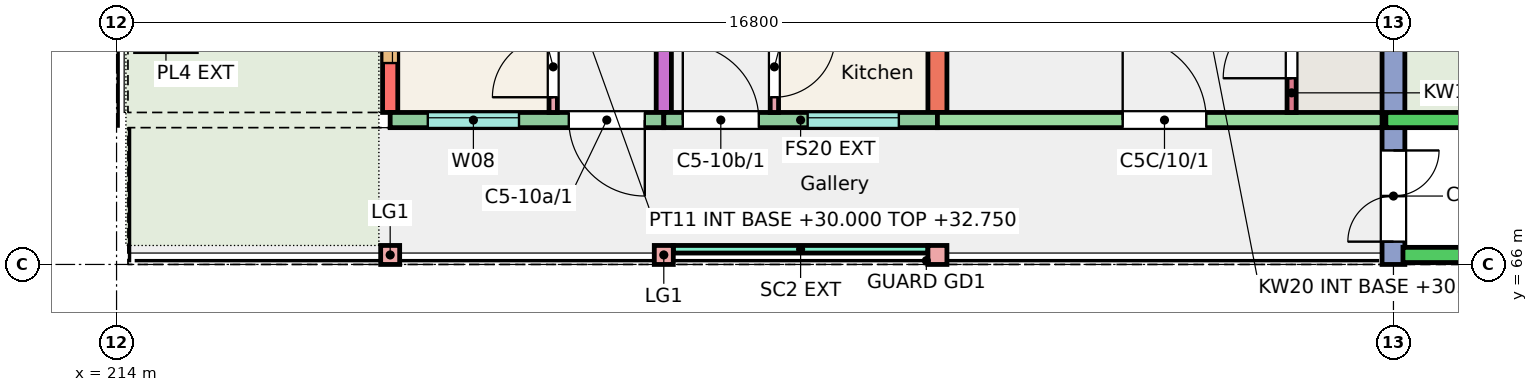
"""IFC4 building model, lengths in metres.
Left out: names, types, materials, properties, quantities, classifications, styles, units other than length and angle.
Written with IfcOpenShell. Run it as: python <this file> out.ifc"""

import sys

from ifc_helpers import new_model, si_unit, direction, frame, frame_2d, origin, origin_2d, place, context, subcontext, project, spatial, rectangle, extrude, element, fill, save


model = new_model("IFC4")
c1 = context("Model", 3, precision=1e-05, world=origin(), true_north=direction((0.0, 1.0)))
c2 = subcontext(c1, "Body", "Model", "MODEL_VIEW")
j1 = project(units=[si_unit("LENGTHUNIT", "METRE"), si_unit("PLANEANGLEUNIT", "RADIAN")], contexts=[c1])
p1 = place(None, origin())
s1 = spatial("IfcSite", under=j1, at=p1, CompositionType="ELEMENT")
p2 = place(p1, origin())
s2 = spatial("IfcBuilding", under=s1, at=p2, CompositionType="ELEMENT")
p3 = place(p2, frame((0.0, 0.0, 30.0)))
s3 = spatial("IfcBuildingStorey", under=s2, at=p3, CompositionType="ELEMENT", Elevation=30.0)
p4 = place(p3, frame((217.6, 68.0, 0.0), z_axis=(0.0, 0.0, 1.0), x_axis=(0.0, 1.0, 0.0)))
e1 = element("IfcWall", 1, at=p4, inside=s3, PredefinedType="SHEAR", context=c2, shape_type="SweptSolid", body=[
    extrude(rectangle(XDim=9.0, YDim=0.2, at=frame_2d((4.5, 0.0))), origin(), (0.0, 0.0, 1.0), 3.0),
])
p5 = place(p4, frame((0.65, 0.0, 0.9)))
e2 = element("IfcOpeningElement", 2, at=p5, cuts=e1, PredefinedType="OPENING", context=c2, shape_type="SweptSolid", body=[
    extrude(rectangle(XDim=1.2, YDim=1.5, at=frame_2d((0.6, 0.75))), frame((0.0, 0.11, 0.0), z_axis=(0.0, -1.0, 0.0), x_axis=(1.0, 0.0, 0.0)), (0.0, 0.0, 1.0), 0.22),
])
p6 = place(p4, frame((4.808, 0.0, 0.9)))
e3 = element("IfcOpeningElement", 3, at=p6, cuts=e1, PredefinedType="OPENING", context=c2, shape_type="SweptSolid", body=[
    extrude(rectangle(XDim=1.2, YDim=1.5, at=frame_2d((0.6, 0.75))), frame((0.0, 0.11, 0.0), z_axis=(0.0, -1.0, 0.0), x_axis=(1.0, 0.0, 0.0)), (0.0, 0.0, 1.0), 0.22),
])
p7 = place(p4, frame((6.305, 0.0, 0.0)))
e4 = element("IfcOpeningElement", 4, at=p7, cuts=e1, PredefinedType="OPENING", context=c2, shape_type="SweptSolid", body=[
    extrude(rectangle(XDim=1.0, YDim=2.1, at=frame_2d((0.5, 1.05))), frame((0.0, 0.11, 0.0), z_axis=(0.0, -1.0, 0.0), x_axis=(1.0, 0.0, 0.0)), (0.0, 0.0, 1.0), 0.22),
])
p8 = place(p3, frame((221.2, 68.0, 0.0), z_axis=(0.0, 0.0, 1.0), x_axis=(0.0, 1.0, 0.0)))
e5 = element("IfcWall", 5, at=p8, inside=s3, PredefinedType="SHEAR", context=c2, shape_type="SweptSolid", body=[
    extrude(rectangle(XDim=9.0, YDim=0.2, at=frame_2d((4.5, 0.0))), origin(), (0.0, 0.0, 1.0), 3.0),
])
p9 = place(p3, frame((224.8, 68.0, 0.0), z_axis=(0.0, 0.0, 1.0), x_axis=(0.0, 1.0, 0.0)))
e6 = element("IfcWall", 6, at=p9, inside=s3, PredefinedType="SHEAR", context=c2, shape_type="SweptSolid", body=[
    extrude(rectangle(XDim=9.0, YDim=0.25, at=frame_2d((4.5, 0.0))), origin(), (0.0, 0.0, 1.0), 3.0),
])
p10 = place(p3, frame((230.8, 66.0, 0.0), z_axis=(0.0, 0.0, 1.0), x_axis=(0.0, 1.0, 0.0)))
e7 = element("IfcWall", 7, at=p10, inside=s3, PredefinedType="SHEAR", context=c2, shape_type="SweptSolid", body=[
    extrude(rectangle(XDim=11.0, YDim=0.3, at=frame_2d((5.5, 0.0))), origin(), (0.0, 0.0, 1.0), 3.0),
])
p11 = place(p10, frame((0.3, 0.0, 0.0)))
e8 = element("IfcOpeningElement", 8, at=p11, cuts=e7, PredefinedType="OPENING", context=c2, shape_type="SweptSolid", body=[
    extrude(rectangle(XDim=1.2, YDim=2.1, at=frame_2d((0.6, 1.05))), frame((0.0, 0.16, 0.0), z_axis=(0.0, -1.0, 0.0), x_axis=(1.0, 0.0, 0.0)), (0.0, 0.0, 1.0), 0.32),
])
p12 = place(p3, frame((217.6, 67.9, 0.0), z_axis=(0.0, 0.0, 1.0), x_axis=(1.0, 0.0, 0.0)))
e9 = element("IfcWall", 9, at=p12, inside=s3, PredefinedType="SOLIDWALL", context=c2, shape_type="SweptSolid", body=[
    extrude(rectangle(XDim=3.6, YDim=0.2, at=frame_2d((1.8, 0.0))), origin(), (0.0, 0.0, 1.0), 3.0),
])
p13 = place(p12, frame((0.495, 0.0, 1.1)))
e10 = element("IfcOpeningElement", 10, at=p13, cuts=e9, PredefinedType="OPENING", context=c2, shape_type="SweptSolid", body=[
    extrude(rectangle(XDim=1.2, YDim=1.3, at=frame_2d((0.6, 0.65))), frame((0.0, 0.11, 0.0), z_axis=(0.0, -1.0, 0.0), x_axis=(1.0, 0.0, 0.0)), (0.0, 0.0, 1.0), 0.22),
])
p14 = place(p12, frame((2.35, 0.0, 0.0)))
e11 = element("IfcOpeningElement", 11, at=p14, cuts=e9, PredefinedType="OPENING", context=c2, shape_type="SweptSolid", body=[
    extrude(rectangle(XDim=1.0, YDim=2.1, at=frame_2d((0.5, 1.05))), frame((0.0, 0.11, 0.0), z_axis=(0.0, -1.0, 0.0), x_axis=(1.0, 0.0, 0.0)), (0.0, 0.0, 1.0), 0.22),
])
p15 = place(p3, frame((221.2, 67.9, 0.0), z_axis=(0.0, 0.0, 1.0), x_axis=(1.0, 0.0, 0.0)))
e12 = element("IfcWall", 12, at=p15, inside=s3, PredefinedType="SOLIDWALL", context=c2, shape_type="SweptSolid", body=[
    extrude(rectangle(XDim=3.6, YDim=0.2, at=frame_2d((1.8, 0.0))), origin(), (0.0, 0.0, 1.0), 3.0),
])
p16 = place(p15, frame((1.893, 0.0, 1.1)))
e13 = element("IfcOpeningElement", 13, at=p16, cuts=e12, PredefinedType="OPENING", context=c2, shape_type="SweptSolid", body=[
    extrude(rectangle(XDim=1.2, YDim=1.3, at=frame_2d((0.6, 0.65))), frame((0.0, 0.11, 0.0), z_axis=(0.0, -1.0, 0.0), x_axis=(1.0, 0.0, 0.0)), (0.0, 0.0, 1.0), 0.22),
])
p17 = place(p15, frame((0.25, 0.0, 0.0)))
e14 = element("IfcOpeningElement", 14, at=p17, cuts=e12, PredefinedType="OPENING", context=c2, shape_type="SweptSolid", body=[
    extrude(rectangle(XDim=1.0, YDim=2.1, at=frame_2d((0.5, 1.05))), frame((0.0, 0.11, 0.0), z_axis=(0.0, -1.0, 0.0), x_axis=(1.0, 0.0, 0.0)), (0.0, 0.0, 1.0), 0.22),
])
p18 = place(p3, frame((224.8, 67.9, 0.0), z_axis=(0.0, 0.0, 1.0), x_axis=(1.0, 0.0, 0.0)))
e15 = element("IfcWall", 15, at=p18, inside=s3, PredefinedType="SHEAR", context=c2, shape_type="SweptSolid", body=[
    extrude(rectangle(XDim=5.85, YDim=0.2, at=frame_2d((2.925, 0.0))), origin(), (0.0, 0.0, 1.0), 3.0),
])
p19 = place(p18, frame((2.438, 0.0, 0.0)))
e16 = element("IfcOpeningElement", 16, at=p19, cuts=e15, PredefinedType="OPENING", context=c2, shape_type="SweptSolid", body=[
    extrude(rectangle(XDim=1.1, YDim=2.1, at=frame_2d((0.55, 1.05))), frame((0.0, 0.11, 0.0), z_axis=(0.0, -1.0, 0.0), x_axis=(1.0, 0.0, 0.0)), (0.0, 0.0, 1.0), 0.22),
])
p20 = place(p3, frame((229.46, 68.0, 0.0), z_axis=(0.0, 0.0, 1.0), x_axis=(0.0, 1.0, 0.0)))
e17 = element("IfcWall", 17, at=p20, inside=s3, PredefinedType="SHEAR", context=c2, shape_type="SweptSolid", body=[
    extrude(rectangle(XDim=1.72, YDim=0.12, at=frame_2d((0.86, 0.0))), origin(), (0.0, 0.0, 1.0), 3.0),
])
p21 = place(p20, frame((0.45, 0.0, 0.0)))
e18 = element("IfcOpeningElement", 18, at=p21, cuts=e17, PredefinedType="OPENING", context=c2, shape_type="SweptSolid", body=[
    extrude(rectangle(XDim=0.9, YDim=2.1, at=frame_2d((0.45, 1.05))), frame((0.0, 0.07, 0.0), z_axis=(0.0, -1.0, 0.0), x_axis=(1.0, 0.0, 0.0)), (0.0, 0.0, 1.0), 0.14),
])
for number, where, z_axis, x_axis in (
    (19, (217.6, 66.125, 0.0), (0.0, 0.0, 1.0), (1.0, 0.0, 0.0)),
    (20, (221.2, 66.125, 0.0), (0.0, 0.0, 1.0), (1.0, 0.0, 0.0)),
    (21, (224.8, 66.125, 0.0), (0.0, 0.0, 1.0), (1.0, 0.0, 0.0)),
):
    element("IfcColumn", number, at=place(p3, frame(where, z_axis=z_axis, x_axis=x_axis)), inside=s3, PredefinedType="COLUMN", context=c2, shape_type="SweptSolid", body=[
        extrude(rectangle(XDim=0.25, YDim=0.25, at=origin_2d()), origin(), (0.0, 0.0, 1.0), 3.0),
    ])
p22 = place(p3, frame((230.7, 67.9, 0.0), z_axis=(0.0, 0.0, 1.0), x_axis=(1.0, 0.0, 0.0)))
e22 = element("IfcWall", 22, at=p22, inside=s3, PredefinedType="PARAPET", context=c2, shape_type="SweptSolid", body=[
    extrude(rectangle(XDim=6.2, YDim=0.2, at=frame_2d((3.1, 0.0))), origin(), (0.0, 0.0, 1.0), 1.1),
])
p23 = place(p3, frame((230.925, 66.125, 0.0), z_axis=(0.0, 0.0, 1.0), x_axis=(1.0, 0.0, 0.0)))
e23 = element("IfcWall", 23, at=p23, inside=s3, PredefinedType="PARAPET", context=c2, shape_type="SweptSolid", body=[
    extrude(rectangle(XDim=5.75, YDim=0.2, at=frame_2d((2.875, 0.0))), origin(), (0.0, 0.0, 1.0), 1.1),
])
p24 = place(p3, frame((214.25, 68.9, 0.01), z_axis=(0.0, 0.0, 1.0), x_axis=(1.0, 0.0, 0.0)))
e24 = element("IfcWall", 24, at=p24, inside=s3, PredefinedType="SOLIDWALL", context=c2, shape_type="SweptSolid", body=[
    extrude(rectangle(XDim=0.8, YDim=0.2, at=frame_2d((0.4, 0.0))), origin(), (0.0, 0.0, 1.0), 0.45),
])
p25 = place(p3, frame((221.325, 66.2, 0.0), z_axis=(0.0, 0.0, 1.0), x_axis=(1.0, 0.0, 0.0)))
e25 = element("IfcWall", 25, at=p25, inside=s3, PredefinedType="SOLIDWALL", context=c2, shape_type="SweptSolid", body=[
    extrude(rectangle(XDim=3.35, YDim=0.1, at=frame_2d((1.675, 0.0))), origin(), (0.0, 0.0, 1.0), 2.45),
])
p26 = place(p3, frame((219.745, 68.0, 0.0), z_axis=(0.0, 0.0, 1.0), x_axis=(0.0, 1.0, 0.0)))
e26 = element("IfcWall", 26, at=p26, inside=s3, PredefinedType="PARTITIONING", context=c2, shape_type="SweptSolid", body=[
    extrude(rectangle(XDim=4.5, YDim=0.11, at=frame_2d((2.25, 0.0))), origin(), (0.0, 0.0, 1.0), 2.75),
])
p27 = place(p26, frame((0.2, 0.0, 0.0)))
e27 = element("IfcOpeningElement", 27, at=p27, cuts=e26, PredefinedType="OPENING", context=c2, shape_type="SweptSolid", body=[
    extrude(rectangle(XDim=0.8, YDim=2.1, at=frame_2d((0.4, 1.05))), frame((0.0, 0.065, 0.0), z_axis=(0.0, -1.0, 0.0), x_axis=(1.0, 0.0, 0.0)), (0.0, 0.0, 1.0), 0.13),
])
p28 = place(p26, frame((3.55, 0.0, 0.0)))
e28 = element("IfcOpeningElement", 28, at=p28, cuts=e26, PredefinedType="OPENING", context=c2, shape_type="SweptSolid", body=[
    extrude(rectangle(XDim=0.8, YDim=2.1, at=frame_2d((0.4, 1.05))), frame((0.0, 0.065, 0.0), z_axis=(0.0, -1.0, 0.0), x_axis=(1.0, 0.0, 0.0)), (0.0, 0.0, 1.0), 0.13),
])
p29 = place(p3, frame((222.655, 68.0, 0.0), z_axis=(0.0, 0.0, 1.0), x_axis=(0.0, 1.0, 0.0)))
e29 = element("IfcWall", 29, at=p29, inside=s3, PredefinedType="PARTITIONING", context=c2, shape_type="SweptSolid", body=[
    extrude(rectangle(XDim=4.3, YDim=0.11, at=frame_2d((2.15, 0.0))), origin(), (0.0, 0.0, 1.0), 2.8),
])
p30 = place(p29, frame((0.2, 0.0, 0.0)))
e30 = element("IfcOpeningElement", 30, at=p30, cuts=e29, PredefinedType="OPENING", context=c2, shape_type="SweptSolid", body=[
    extrude(rectangle(XDim=0.8, YDim=2.1, at=frame_2d((0.4, 1.05))), frame((0.0, 0.065, 0.0), z_axis=(0.0, -1.0, 0.0), x_axis=(1.0, 0.0, 0.0)), (0.0, 0.0, 1.0), 0.13),
])
p31 = place(p29, frame((3.35, 0.0, 0.0)))
e31 = element("IfcOpeningElement", 31, at=p31, cuts=e29, PredefinedType="OPENING", context=c2, shape_type="SweptSolid", body=[
    extrude(rectangle(XDim=0.8, YDim=2.1, at=frame_2d((0.4, 1.05))), frame((0.0, 0.065, 0.0), z_axis=(0.0, -1.0, 0.0), x_axis=(1.0, 0.0, 0.0)), (0.0, 0.0, 1.0), 0.13),
])
p32 = place(p13, origin())
e32 = element("IfcWindow", 32, at=p32, inside=s3, PartitioningType="SINGLE_PANEL", PredefinedType="WINDOW", context=c2, shape_type="SweptSolid", body=[
    extrude(rectangle(XDim=1.2, YDim=1.3, at=frame_2d((0.6, 0.65))), frame((0.0, 0.06, 0.0), z_axis=(0.0, -1.0, 0.0), x_axis=(1.0, 0.0, 0.0)), (0.0, 0.0, 1.0), 0.06),
])
fill(e10, e32)
p33 = place(p5, origin())
e33 = element("IfcWindow", 33, at=p33, inside=s3, PartitioningType="SINGLE_PANEL", PredefinedType="WINDOW", context=c2, shape_type="SweptSolid", body=[
    extrude(rectangle(XDim=1.2, YDim=1.5, at=frame_2d((0.6, 0.75))), frame((0.0, 0.0, 0.0), z_axis=(0.0, -1.0, 0.0), x_axis=(1.0, 0.0, 0.0)), (0.0, 0.0, 1.0), 0.06),
])
fill(e2, e33)
p34 = place(p16, origin())
e34 = element("IfcWindow", 34, at=p34, inside=s3, PartitioningType="SINGLE_PANEL", PredefinedType="WINDOW", context=c2, shape_type="SweptSolid", body=[
    extrude(rectangle(XDim=1.2, YDim=1.3, at=frame_2d((0.6, 0.65))), frame((0.0, 0.06, 0.0), z_axis=(0.0, -1.0, 0.0), x_axis=(1.0, 0.0, 0.0)), (0.0, 0.0, 1.0), 0.06),
])
fill(e13, e34)
p35 = place(p14, origin())
e35 = element("IfcDoor", 35, at=p35, inside=s3, OperationType="SINGLE_SWING_RIGHT", PredefinedType="DOOR", context=c2, shape_type="SweptSolid", body=[
    extrude(rectangle(XDim=1.0, YDim=2.1, at=frame_2d((0.5, 1.05))), frame((0.0, 0.025, 0.0), z_axis=(0.0, -1.0, 0.0), x_axis=(1.0, 0.0, 0.0)), (0.0, 0.0, 1.0), 0.05),
])
fill(e11, e35)
p36 = place(p27, origin())
e36 = element("IfcDoor", 36, at=p36, inside=s3, OperationType="SINGLE_SWING_LEFT", PredefinedType="DOOR", context=c2, shape_type="SweptSolid", body=[
    extrude(rectangle(XDim=0.8, YDim=2.1, at=frame_2d((0.4, 1.05))), frame((0.0, 0.025, 0.0), z_axis=(0.0, -1.0, 0.0), x_axis=(1.0, 0.0, 0.0)), (0.0, 0.0, 1.0), 0.05),
])
fill(e27, e36)
p37 = place(p17, origin())
e37 = element("IfcDoor", 37, at=p37, inside=s3, OperationType="SINGLE_SWING_LEFT", PredefinedType="DOOR", context=c2, shape_type="SweptSolid", body=[
    extrude(rectangle(XDim=1.0, YDim=2.1, at=frame_2d((0.5, 1.05))), frame((0.0, 0.025, 0.0), z_axis=(0.0, -1.0, 0.0), x_axis=(1.0, 0.0, 0.0)), (0.0, 0.0, 1.0), 0.05),
])
fill(e14, e37)
p38 = place(p30, origin())
e38 = element("IfcDoor", 38, at=p38, inside=s3, OperationType="SINGLE_SWING_RIGHT", PredefinedType="DOOR", context=c2, shape_type="SweptSolid", body=[
    extrude(rectangle(XDim=0.8, YDim=2.1, at=frame_2d((0.4, 1.05))), frame((0.0, 0.025, 0.0), z_axis=(0.0, -1.0, 0.0), x_axis=(1.0, 0.0, 0.0)), (0.0, 0.0, 1.0), 0.05),
])
fill(e30, e38)
p39 = place(p19, origin())
e39 = element("IfcDoor", 39, at=p39, inside=s3, OperationType="SINGLE_SWING_LEFT", PredefinedType="DOOR", context=c2, shape_type="SweptSolid", body=[
    extrude(rectangle(XDim=1.1, YDim=2.1, at=frame_2d((0.55, 1.05))), frame((0.0, 0.025, 0.0), z_axis=(0.0, -1.0, 0.0), x_axis=(1.0, 0.0, 0.0)), (0.0, 0.0, 1.0), 0.05),
])
fill(e16, e39)
p40 = place(p21, origin())
e40 = element("IfcDoor", 40, at=p40, inside=s3, OperationType="SINGLE_SWING_LEFT", PredefinedType="DOOR", context=c2, shape_type="SweptSolid", body=[
    extrude(rectangle(XDim=0.9, YDim=2.1, at=frame_2d((0.45, 1.05))), frame((0.0, 0.025, 0.0), z_axis=(0.0, -1.0, 0.0), x_axis=(1.0, 0.0, 0.0)), (0.0, 0.0, 1.0), 0.05),
])
fill(e18, e40)
p41 = place(p11, origin())
e41 = element("IfcDoor", 41, at=p41, inside=s3, OperationType="DOUBLE_DOOR_SINGLE_SWING", PredefinedType="DOOR", context=c2, shape_type="SweptSolid", body=[
    extrude(rectangle(XDim=1.2, YDim=2.1, at=frame_2d((0.6, 1.05))), frame((0.0, 0.025, 0.0), z_axis=(0.0, -1.0, 0.0), x_axis=(1.0, 0.0, 0.0)), (0.0, 0.0, 1.0), 0.05),
])
fill(e8, e41)
save(model, sys.argv[1])
